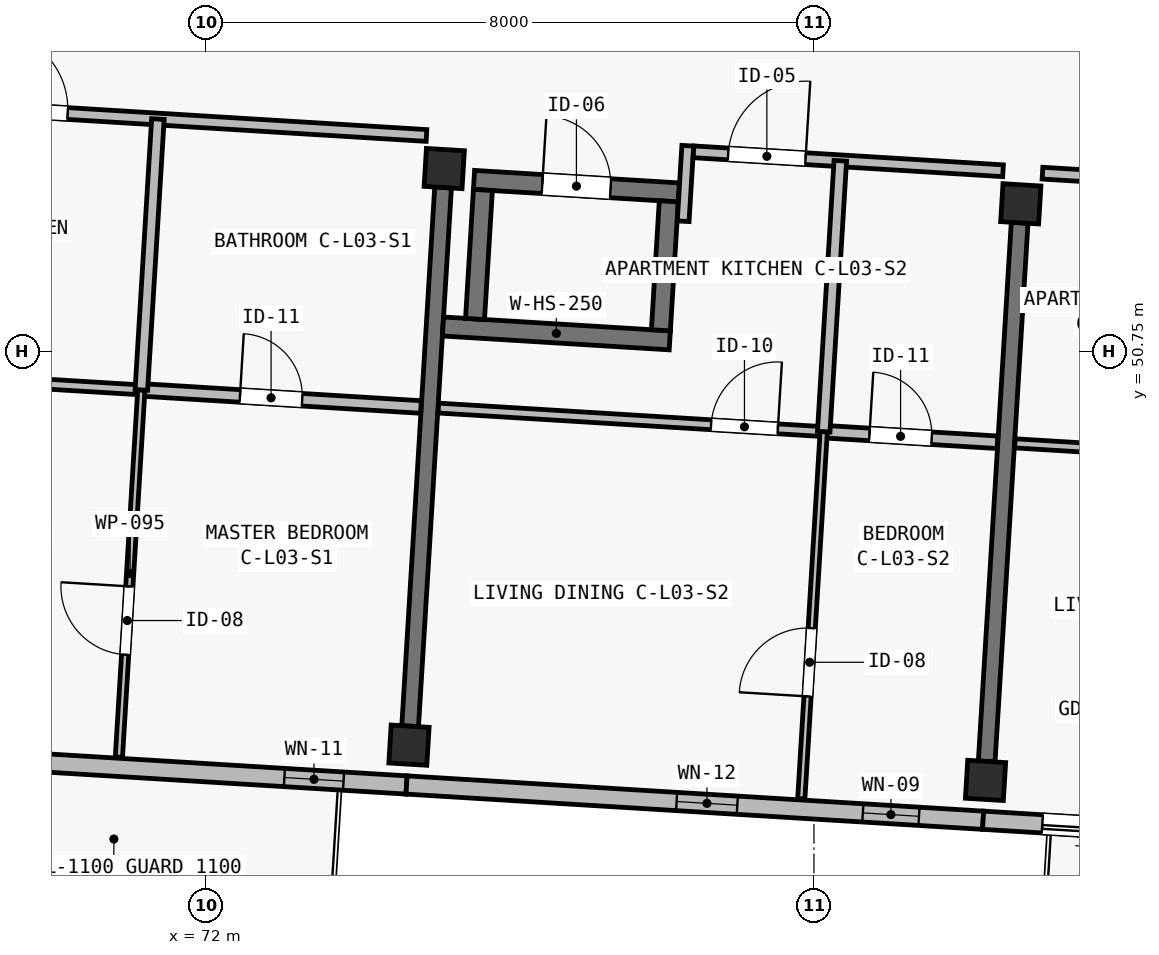
"""IFC4 building model, lengths in metres.
Left out: names, types, materials, properties, quantities, classifications, styles, units other than length and angle.
Written with IfcOpenShell. Run it as: python <this file> out.ifc"""

import sys

from ifc_helpers import new_model, si_unit, direction, frame, frame_2d, origin, origin_2d, place, context, subcontext, project, spatial, rectangle, extrude, element, fill, save


model = new_model("IFC4")
c1 = context("Model", 3, precision=1e-05, world=origin(), true_north=direction((0.0, 1.0)))
c2 = subcontext(c1, "Body", "Model", "MODEL_VIEW")
j1 = project(units=[si_unit("LENGTHUNIT", "METRE"), si_unit("PLANEANGLEUNIT", "RADIAN")], contexts=[c1])
p1 = place(None, origin())
s1 = spatial("IfcSite", under=j1, at=p1, CompositionType="ELEMENT")
p2 = place(p1, origin())
s2 = spatial("IfcBuilding", under=s1, at=p2, CompositionType="ELEMENT")
p3 = place(p2, frame((0.0, 0.0, 11.65)))
s3 = spatial("IfcBuildingStorey", under=s2, at=p3, CompositionType="ELEMENT", Elevation=11.65)
for number, where, z_axis, x_axis in (
    (1, (74.672, 45.572, 0.0), (0.0, 0.0, 1.0), (0.998, -0.061, 0.0)),
    (2, (75.135, 53.158, 0.0), (0.0, 0.0, 1.0), (0.998, -0.061, 0.0)),
    (3, (82.258, 45.108, 0.0), (0.0, 0.0, 1.0), (0.998, -0.061, 0.0)),
    (4, (82.721, 52.694, 0.0), (0.0, 0.0, 1.0), (0.998, -0.061, 0.0)),
):
    element("IfcColumn", number, at=place(p3, frame(where, z_axis=z_axis, x_axis=x_axis)), inside=s3, PredefinedType="COLUMN", context=c2, shape_type="SweptSolid", body=[
        extrude(rectangle(XDim=0.5, YDim=0.5, at=origin_2d()), origin(), (0.0, 0.0, 1.0), 3.25),
    ])
p4 = place(p3, frame((74.687, 45.822, 0.0), z_axis=(0.0, 0.0, 1.0), x_axis=(0.061033859059, 0.99813569621, 0.0)))
e5 = element("IfcWall", 5, at=p4, inside=s3, PredefinedType="SHEAR", context=c2, shape_type="SweptSolid", body=[
    extrude(rectangle(XDim=7.1, YDim=0.22, at=frame_2d((3.55, 0.0))), origin(), (0.0, 0.0, 1.0), 2.5),
])
p5 = place(p3, frame((82.273, 45.358, 0.0), z_axis=(0.0, 0.0, 1.0), x_axis=(0.061070212127, 0.998133472633, 0.0)))
e6 = element("IfcWall", 6, at=p5, inside=s3, PredefinedType="SHEAR", context=c2, shape_type="SweptSolid", body=[
    extrude(rectangle(XDim=7.1, YDim=0.22, at=frame_2d((3.55, 0.0))), origin(), (0.0, 0.0, 1.0), 2.5),
])
p6 = place(p3, frame((75.119, 51.08, 0.0), z_axis=(0.0, 0.0, 1.0), x_axis=(0.998133370443, -0.061071882298, 0.0)))
e7 = element("IfcWall", 7, at=p6, inside=s3, PredefinedType="SHEAR", context=c2, shape_type="SweptSolid", body=[
    extrude(rectangle(XDim=2.99, YDim=0.25, at=frame_2d((1.495, 0.0))), origin(), (0.0, 0.0, 1.0), 3.25),
])
p7 = place(p3, frame((75.527, 53.009, 0.0), z_axis=(0.0, 0.0, 1.0), x_axis=(0.998129907752, -0.061128448781, 0.0)))
e8 = element("IfcWall", 8, at=p7, inside=s3, PredefinedType="SHEAR", context=c2, shape_type="SweptSolid", body=[
    extrude(rectangle(XDim=2.7, YDim=0.25, at=frame_2d((1.35, 0.0))), origin(), (0.0, 0.0, 1.0), 3.25),
])
p8 = place(p7, frame((0.9, 0.0, 0.0)))
e9 = element("IfcOpeningElement", 9, at=p8, cuts=e8, PredefinedType="OPENING", context=c2, shape_type="SweptSolid", body=[
    extrude(rectangle(XDim=0.9, YDim=2.05, at=frame_2d((0.45, 1.025))), frame((0.0, 0.14, 0.0), z_axis=(0.0, -1.0, 0.0), x_axis=(1.0, 0.0, 0.0)), (0.0, 0.0, 1.0), 0.28),
])
p9 = place(p3, frame((75.541, 51.179, 0.0), z_axis=(0.0, 0.0, 1.0), x_axis=(0.061037062968, 0.998135500293, 0.0)))
e10 = element("IfcWall", 10, at=p9, inside=s3, PredefinedType="SHEAR", context=c2, shape_type="SweptSolid", body=[
    extrude(rectangle(XDim=1.7, YDim=0.25, at=frame_2d((0.85, 0.0))), origin(), (0.0, 0.0, 1.0), 3.25),
])
p10 = place(p3, frame((77.986, 51.03, 0.0), z_axis=(0.0, 0.0, 1.0), x_axis=(0.061028314627, 0.998136035225, 0.0)))
e11 = element("IfcWall", 11, at=p10, inside=s3, PredefinedType="SHEAR", context=c2, shape_type="SweptSolid", body=[
    extrude(rectangle(XDim=1.7, YDim=0.25, at=frame_2d((0.85, 0.0))), origin(), (0.0, 0.0, 1.0), 3.25),
])
p11 = place(p3, frame((74.64, 45.048, 0.0), z_axis=(0.0, 0.0, 1.0), x_axis=(-0.998135669243, 0.061034300063, 0.0)))
e12 = element("IfcWall", 12, at=p11, inside=s3, PredefinedType="SOLIDWALL", context=c2, shape_type="SweptSolid", body=[
    extrude(rectangle(XDim=7.6, YDim=0.24, at=frame_2d((3.8, 0.0))), origin(), (0.0, 0.0, 1.0), 3.0),
])
p12 = place(p11, frame((5.169, 0.0, 0.0)))
e13 = element("IfcOpeningElement", 13, at=p12, cuts=e12, PredefinedType="OPENING", context=c2, shape_type="SweptSolid", body=[
    extrude(rectangle(XDim=1.5, YDim=2.12, at=frame_2d((0.75, 1.06))), frame((0.0, 0.135, 0.0), z_axis=(0.0, -1.0, 0.0), x_axis=(1.0, 0.0, 0.0)), (0.0, 0.0, 1.0), 0.27),
])
p13 = place(p11, frame((0.83, 0.0, 0.46)))
e14 = element("IfcOpeningElement", 14, at=p13, cuts=e12, PredefinedType="OPENING", context=c2, shape_type="SweptSolid", body=[
    extrude(rectangle(XDim=0.78, YDim=2.2, at=frame_2d((0.39, 1.1))), frame((0.0, 0.135, 0.0), z_axis=(0.0, -1.0, 0.0), x_axis=(1.0, 0.0, 0.0)), (0.0, 0.0, 1.0), 0.27),
])
p14 = place(p3, frame((82.225, 44.584, 0.0), z_axis=(0.0, 0.0, 1.0), x_axis=(-0.998133591969, 0.061068261669, 0.0)))
e15 = element("IfcWall", 15, at=p14, inside=s3, PredefinedType="SOLIDWALL", context=c2, shape_type="SweptSolid", body=[
    extrude(rectangle(XDim=7.6, YDim=0.24, at=frame_2d((3.8, 0.0))), origin(), (0.0, 0.0, 1.0), 3.0),
])
p15 = place(p14, frame((0.845, 0.0, 0.52)))
e16 = element("IfcOpeningElement", 16, at=p15, cuts=e15, PredefinedType="OPENING", context=c2, shape_type="SweptSolid", body=[
    extrude(rectangle(XDim=0.74, YDim=2.26, at=frame_2d((0.37, 1.13))), frame((0.0, 0.135, 0.0), z_axis=(0.0, -1.0, 0.0), x_axis=(1.0, 0.0, 0.0)), (0.0, 0.0, 1.0), 0.27),
])
p16 = place(p14, frame((3.24, 0.0, 0.52)))
e17 = element("IfcOpeningElement", 17, at=p16, cuts=e15, PredefinedType="OPENING", context=c2, shape_type="SweptSolid", body=[
    extrude(rectangle(XDim=0.8, YDim=2.3, at=frame_2d((0.4, 1.15))), frame((0.0, 0.135, 0.0), z_axis=(0.0, -1.0, 0.0), x_axis=(1.0, 0.0, 0.0)), (0.0, 0.0, 1.0), 0.27),
])
p17 = place(p3, frame((89.811, 44.12, 0.0), z_axis=(0.0, 0.0, 1.0), x_axis=(-0.998135669243, 0.061034300063, 0.0)))
e18 = element("IfcWall", 18, at=p17, inside=s3, PredefinedType="SOLIDWALL", context=c2, shape_type="SweptSolid", body=[
    extrude(rectangle(XDim=7.6, YDim=0.24, at=frame_2d((3.8, 0.0))), origin(), (0.0, 0.0, 1.0), 3.0),
])
p18 = place(p17, frame((5.019, 0.0, 0.0)))
e19 = element("IfcOpeningElement", 19, at=p18, cuts=e18, PredefinedType="OPENING", context=c2, shape_type="SweptSolid", body=[
    extrude(rectangle(XDim=1.8, YDim=2.12, at=frame_2d((0.9, 1.06))), frame((0.0, 0.135, 0.0), z_axis=(0.0, -1.0, 0.0), x_axis=(1.0, 0.0, 0.0)), (0.0, 0.0, 1.0), 0.27),
])
p19 = place(p17, frame((1.03, 0.0, 0.42)))
e20 = element("IfcOpeningElement", 20, at=p19, cuts=e18, PredefinedType="OPENING", context=c2, shape_type="SweptSolid", body=[
    extrude(rectangle(XDim=0.6, YDim=2.22, at=frame_2d((0.3, 1.11))), frame((0.0, 0.135, 0.0), z_axis=(0.0, -1.0, 0.0), x_axis=(1.0, 0.0, 0.0)), (0.0, 0.0, 1.0), 0.27),
])
p20 = place(p3, frame((67.835, 54.025, 0.0), z_axis=(0.0, 0.0, 1.0), x_axis=(0.998135666539, -0.061034344288, 0.0)))
e21 = element("IfcWall", 21, at=p20, inside=s3, PredefinedType="PARTITIONING", context=c2, shape_type="SweptSolid", body=[
    extrude(rectangle(XDim=7.08, YDim=0.155, at=frame_2d((3.54, 0.0))), origin(), (0.0, 0.0, 1.0), 2.97),
])
p21 = place(p20, frame((1.33, 0.0, 0.0)))
e22 = element("IfcOpeningElement", 22, at=p21, cuts=e21, PredefinedType="OPENING", context=c2, shape_type="SweptSolid", body=[
    extrude(rectangle(XDim=1.02, YDim=2.2, at=frame_2d((0.51, 1.1))), frame((0.0, 0.093, 0.0), z_axis=(0.0, -1.0, 0.0), x_axis=(1.0, 0.0, 0.0)), (0.0, 0.0, 1.0), 0.185),
])
p22 = place(p3, frame((67.472, 50.471, 0.0), z_axis=(0.0, 0.0, 1.0), x_axis=(0.998136719672, -0.061017119263, 0.0)))
e23 = element("IfcWall", 23, at=p22, inside=s3, PredefinedType="PARTITIONING", context=c2, shape_type="SweptSolid", body=[
    extrude(rectangle(XDim=3.685, YDim=0.13, at=frame_2d((1.843, 0.0))), origin(), (0.0, 0.0, 1.0), 2.97),
])
p23 = place(p22, frame((1.525, 0.0, 0.0)))
e24 = element("IfcOpeningElement", 24, at=p23, cuts=e23, PredefinedType="OPENING", context=c2, shape_type="SweptSolid", body=[
    extrude(rectangle(XDim=0.88, YDim=2.1, at=frame_2d((0.44, 1.05))), frame((0.0, 0.08, 0.0), z_axis=(0.0, -1.0, 0.0), x_axis=(1.0, 0.0, 0.0)), (0.0, 0.0, 1.0), 0.16),
])
p24 = place(p3, frame((71.15, 50.246, 0.0), z_axis=(0.0, 0.0, 1.0), x_axis=(0.998132682596, -0.061083123148, 0.0)))
e25 = element("IfcWall", 25, at=p24, inside=s3, PredefinedType="PLUMBINGWALL", context=c2, shape_type="SweptSolid", body=[
    extrude(rectangle(XDim=3.685, YDim=0.165, at=frame_2d((1.843, 0.0))), origin(), (0.0, 0.0, 1.0), 2.97),
])
p25 = place(p24, frame((1.3, 0.0, 0.0)))
e26 = element("IfcOpeningElement", 26, at=p25, cuts=e25, PredefinedType="OPENING", context=c2, shape_type="SweptSolid", body=[
    extrude(rectangle(XDim=0.82, YDim=2.08, at=frame_2d((0.41, 1.04))), frame((0.0, 0.097, 0.0), z_axis=(0.0, -1.0, 0.0), x_axis=(1.0, 0.0, 0.0)), (0.0, 0.0, 1.0), 0.195),
])
p26 = place(p3, frame((70.855, 45.415, 0.0), z_axis=(0.0, 0.0, 1.0), x_axis=(0.061034170677, 0.998135677155, 0.0)))
e27 = element("IfcWall", 27, at=p26, inside=s3, PredefinedType="PARTITIONING", context=c2, shape_type="SweptSolid", body=[
    extrude(rectangle(XDim=4.84, YDim=0.095, at=frame_2d((2.42, 0.0))), origin(), (0.0, 0.0, 1.0), 2.97),
])
p27 = place(p26, frame((1.35, 0.0, 0.0)))
e28 = element("IfcOpeningElement", 28, at=p27, cuts=e27, PredefinedType="OPENING", context=c2, shape_type="SweptSolid", body=[
    extrude(rectangle(XDim=0.9, YDim=2.1, at=frame_2d((0.45, 1.05))), frame((0.0, 0.062, 0.0), z_axis=(0.0, -1.0, 0.0), x_axis=(1.0, 0.0, 0.0)), (0.0, 0.0, 1.0), 0.125),
])
p28 = place(p3, frame((71.15, 50.246, 0.0), z_axis=(0.0, 0.0, 1.0), x_axis=(0.061071129902, 0.998133416479, 0.0)))
e29 = element("IfcWall", 29, at=p28, inside=s3, PredefinedType="PLUMBINGWALL", context=c2, shape_type="SweptSolid", body=[
    extrude(rectangle(XDim=3.57, YDim=0.165, at=frame_2d((1.785, 0.0))), origin(), (0.0, 0.0, 1.0), 2.97),
])
p29 = place(p3, frame((78.279, 52.465, 0.0), z_axis=(0.0, 0.0, 1.0), x_axis=(0.061095097219, 0.998131949742, 0.0)))
e30 = element("IfcWall", 30, at=p29, inside=s3, PredefinedType="PARTITIONING", context=c2, shape_type="SweptSolid", body=[
    extrude(rectangle(XDim=0.995, YDim=0.155, at=frame_2d((0.498, 0.0))), origin(), (0.0, 0.0, 1.0), 2.97),
])
p30 = place(p3, frame((78.415, 53.378, 0.0), z_axis=(0.0, 0.0, 1.0), x_axis=(0.998131852862, -0.061096679962, 0.0)))
e31 = element("IfcWall", 31, at=p30, inside=s3, PredefinedType="PARTITIONING", context=c2, shape_type="SweptSolid", body=[
    extrude(rectangle(XDim=4.08, YDim=0.155, at=frame_2d((2.04, 0.0))), origin(), (0.0, 0.0, 1.0), 2.97),
])
p31 = place(p30, frame((0.457, 0.0, 0.0)))
e32 = element("IfcOpeningElement", 32, at=p31, cuts=e31, PredefinedType="OPENING", context=c2, shape_type="SweptSolid", body=[
    extrude(rectangle(XDim=1.02, YDim=2.2, at=frame_2d((0.51, 1.1))), frame((0.0, 0.093, 0.0), z_axis=(0.0, -1.0, 0.0), x_axis=(1.0, 0.0, 0.0)), (0.0, 0.0, 1.0), 0.185),
])
p32 = place(p3, frame((75.058, 50.007, 0.0), z_axis=(0.0, 0.0, 1.0), x_axis=(0.998132708268, -0.061082703655, 0.0)))
e33 = element("IfcWall", 33, at=p32, inside=s3, PredefinedType="PARTITIONING", context=c2, shape_type="SweptSolid", body=[
    extrude(rectangle(XDim=5.08, YDim=0.13, at=frame_2d((2.54, 0.0))), origin(), (0.0, 0.0, 1.0), 2.97),
])
p33 = place(p32, frame((3.595, 0.0, 0.0)))
e34 = element("IfcOpeningElement", 34, at=p33, cuts=e33, PredefinedType="OPENING", context=c2, shape_type="SweptSolid", body=[
    extrude(rectangle(XDim=0.88, YDim=2.1, at=frame_2d((0.44, 1.05))), frame((0.0, 0.08, 0.0), z_axis=(0.0, -1.0, 0.0), x_axis=(1.0, 0.0, 0.0)), (0.0, 0.0, 1.0), 0.16),
])
p34 = place(p3, frame((80.129, 49.697, 0.0), z_axis=(0.0, 0.0, 1.0), x_axis=(0.998138723231, -0.060984335579, 0.0)))
e35 = element("IfcWall", 35, at=p34, inside=s3, PredefinedType="PLUMBINGWALL", context=c2, shape_type="SweptSolid", body=[
    extrude(rectangle(XDim=2.29, YDim=0.165, at=frame_2d((1.145, 0.0))), origin(), (0.0, 0.0, 1.0), 2.97),
])
p35 = place(p34, frame((0.603, 0.0, 0.0)))
e36 = element("IfcOpeningElement", 36, at=p35, cuts=e35, PredefinedType="OPENING", context=c2, shape_type="SweptSolid", body=[
    extrude(rectangle(XDim=0.82, YDim=2.08, at=frame_2d((0.41, 1.04))), frame((0.0, 0.097, 0.0), z_axis=(0.0, -1.0, 0.0), x_axis=(1.0, 0.0, 0.0)), (0.0, 0.0, 1.0), 0.195),
])
p36 = place(p3, frame((79.833, 44.866, 0.0), z_axis=(0.0, 0.0, 1.0), x_axis=(0.061037243745, 0.998135489238, 0.0)))
e37 = element("IfcWall", 37, at=p36, inside=s3, PredefinedType="PARTITIONING", context=c2, shape_type="SweptSolid", body=[
    extrude(rectangle(XDim=4.84, YDim=0.095, at=frame_2d((2.42, 0.0))), origin(), (0.0, 0.0, 1.0), 2.97),
])
p37 = place(p36, frame((1.35, 0.0, 0.0)))
e38 = element("IfcOpeningElement", 38, at=p37, cuts=e37, PredefinedType="OPENING", context=c2, shape_type="SweptSolid", body=[
    extrude(rectangle(XDim=0.9, YDim=2.1, at=frame_2d((0.45, 1.05))), frame((0.0, 0.062, 0.0), z_axis=(0.0, -1.0, 0.0), x_axis=(1.0, 0.0, 0.0)), (0.0, 0.0, 1.0), 0.125),
])
p38 = place(p3, frame((80.129, 49.697, 0.0), z_axis=(0.0, 0.0, 1.0), x_axis=(0.061066961405, 0.998133671521, 0.0)))
e39 = element("IfcWall", 39, at=p38, inside=s3, PredefinedType="PLUMBINGWALL", context=c2, shape_type="SweptSolid", body=[
    extrude(rectangle(XDim=3.57, YDim=0.165, at=frame_2d((1.785, 0.0))), origin(), (0.0, 0.0, 1.0), 2.97),
])
p39 = place(p3, frame((83.007, 53.097, 0.0), z_axis=(0.0, 0.0, 1.0), x_axis=(0.998135666539, -0.061034344288, 0.0)))
e40 = element("IfcWall", 40, at=p39, inside=s3, PredefinedType="PARTITIONING", context=c2, shape_type="SweptSolid", body=[
    extrude(rectangle(XDim=7.08, YDim=0.155, at=frame_2d((3.54, 0.0))), origin(), (0.0, 0.0, 1.0), 2.97),
])
p40 = place(p39, frame((1.33, 0.0, 0.0)))
e41 = element("IfcOpeningElement", 41, at=p40, cuts=e40, PredefinedType="OPENING", context=c2, shape_type="SweptSolid", body=[
    extrude(rectangle(XDim=0.98, YDim=2.15, at=frame_2d((0.49, 1.075))), frame((0.0, 0.093, 0.0), z_axis=(0.0, -1.0, 0.0), x_axis=(1.0, 0.0, 0.0)), (0.0, 0.0, 1.0), 0.185),
])
p41 = place(p3, frame((82.644, 49.543, 0.0), z_axis=(0.0, 0.0, 1.0), x_axis=(0.998136472989, -0.061021154439, 0.0)))
e42 = element("IfcWall", 42, at=p41, inside=s3, PredefinedType="PARTITIONING", context=c2, shape_type="SweptSolid", body=[
    extrude(rectangle(XDim=3.685, YDim=0.12, at=frame_2d((1.842, 0.0))), origin(), (0.0, 0.0, 1.0), 2.97),
])
p42 = place(p41, frame((1.525, 0.0, 0.0)))
e43 = element("IfcOpeningElement", 43, at=p42, cuts=e42, PredefinedType="OPENING", context=c2, shape_type="SweptSolid", body=[
    extrude(rectangle(XDim=0.9, YDim=2.1, at=frame_2d((0.45, 1.05))), frame((0.0, 0.075, 0.0), z_axis=(0.0, -1.0, 0.0), x_axis=(1.0, 0.0, 0.0)), (0.0, 0.0, 1.0), 0.15),
])
p43 = place(p13, origin())
e44 = element("IfcWindow", 44, at=p43, inside=s3, PartitioningType="SINGLE_PANEL", PredefinedType="WINDOW", context=c2, shape_type="SweptSolid", body=[
    extrude(rectangle(XDim=0.78, YDim=2.2, at=frame_2d((0.39, 1.1))), frame((0.0, 0.03, 0.0), z_axis=(0.0, -1.0, 0.0), x_axis=(1.0, 0.0, 0.0)), (0.0, 0.0, 1.0), 0.06),
])
fill(e14, e44)
p44 = place(p15, origin())
e45 = element("IfcWindow", 45, at=p44, inside=s3, PartitioningType="SINGLE_PANEL", PredefinedType="WINDOW", context=c2, shape_type="SweptSolid", body=[
    extrude(rectangle(XDim=0.74, YDim=2.26, at=frame_2d((0.37, 1.13))), frame((0.0, 0.03, 0.0), z_axis=(0.0, -1.0, 0.0), x_axis=(1.0, 0.0, 0.0)), (0.0, 0.0, 1.0), 0.06),
])
fill(e16, e45)
p45 = place(p16, origin())
e46 = element("IfcWindow", 46, at=p45, inside=s3, PartitioningType="SINGLE_PANEL", PredefinedType="WINDOW", context=c2, shape_type="SweptSolid", body=[
    extrude(rectangle(XDim=0.8, YDim=2.3, at=frame_2d((0.4, 1.15))), frame((0.0, 0.03, 0.0), z_axis=(0.0, -1.0, 0.0), x_axis=(1.0, 0.0, 0.0)), (0.0, 0.0, 1.0), 0.06),
])
fill(e17, e46)
p46 = place(p18, origin())
e47 = element("IfcDoor", 47, at=p46, inside=s3, OperationType="SLIDING_TO_LEFT", PredefinedType="DOOR", context=c2, shape_type="SweptSolid", body=[
    extrude(rectangle(XDim=1.8, YDim=2.12, at=frame_2d((0.9, 1.06))), frame((0.0, 0.025, 0.0), z_axis=(0.0, -1.0, 0.0), x_axis=(1.0, 0.0, 0.0)), (0.0, 0.0, 1.0), 0.05),
])
fill(e19, e47)
p47 = place(p21, origin())
e48 = element("IfcDoor", 48, at=p47, inside=s3, OperationType="SINGLE_SWING_LEFT", PredefinedType="DOOR", context=c2, shape_type="SweptSolid", body=[
    extrude(rectangle(XDim=1.02, YDim=2.2, at=frame_2d((0.51, 1.1))), frame((0.0, 0.025, 0.0), z_axis=(0.0, -1.0, 0.0), x_axis=(1.0, 0.0, 0.0)), (0.0, 0.0, 1.0), 0.05),
])
fill(e22, e48)
p48 = place(p25, origin())
e49 = element("IfcDoor", 49, at=p48, inside=s3, OperationType="SINGLE_SWING_LEFT", PredefinedType="DOOR", context=c2, shape_type="SweptSolid", body=[
    extrude(rectangle(XDim=0.82, YDim=2.08, at=frame_2d((0.41, 1.04))), frame((0.0, 0.025, 0.0), z_axis=(0.0, -1.0, 0.0), x_axis=(1.0, 0.0, 0.0)), (0.0, 0.0, 1.0), 0.05),
])
fill(e26, e49)
p49 = place(p27, origin())
e50 = element("IfcDoor", 50, at=p49, inside=s3, OperationType="SINGLE_SWING_RIGHT", PredefinedType="DOOR", context=c2, shape_type="SweptSolid", body=[
    extrude(rectangle(XDim=0.9, YDim=2.1, at=frame_2d((0.45, 1.05))), frame((0.0, 0.025, 0.0), z_axis=(0.0, -1.0, 0.0), x_axis=(1.0, 0.0, 0.0)), (0.0, 0.0, 1.0), 0.05),
])
fill(e28, e50)
p50 = place(p31, origin())
e51 = element("IfcDoor", 51, at=p50, inside=s3, OperationType="SINGLE_SWING_RIGHT", PredefinedType="DOOR", context=c2, shape_type="SweptSolid", body=[
    extrude(rectangle(XDim=1.02, YDim=2.2, at=frame_2d((0.51, 1.1))), frame((0.0, 0.025, 0.0), z_axis=(0.0, -1.0, 0.0), x_axis=(1.0, 0.0, 0.0)), (0.0, 0.0, 1.0), 0.05),
])
fill(e32, e51)
p51 = place(p33, origin())
e52 = element("IfcDoor", 52, at=p51, inside=s3, OperationType="SINGLE_SWING_RIGHT", PredefinedType="DOOR", context=c2, shape_type="SweptSolid", body=[
    extrude(rectangle(XDim=0.88, YDim=2.1, at=frame_2d((0.44, 1.05))), frame((0.0, 0.025, 0.0), z_axis=(0.0, -1.0, 0.0), x_axis=(1.0, 0.0, 0.0)), (0.0, 0.0, 1.0), 0.05),
])
fill(e34, e52)
p52 = place(p35, origin())
e53 = element("IfcDoor", 53, at=p52, inside=s3, OperationType="SINGLE_SWING_LEFT", PredefinedType="DOOR", context=c2, shape_type="SweptSolid", body=[
    extrude(rectangle(XDim=0.82, YDim=2.08, at=frame_2d((0.41, 1.04))), frame((0.0, 0.025, 0.0), z_axis=(0.0, -1.0, 0.0), x_axis=(1.0, 0.0, 0.0)), (0.0, 0.0, 1.0), 0.05),
])
fill(e36, e53)
p53 = place(p37, origin())
e54 = element("IfcDoor", 54, at=p53, inside=s3, OperationType="SINGLE_SWING_LEFT", PredefinedType="DOOR", context=c2, shape_type="SweptSolid", body=[
    extrude(rectangle(XDim=0.9, YDim=2.1, at=frame_2d((0.45, 1.05))), frame((0.0, 0.025, 0.0), z_axis=(0.0, -1.0, 0.0), x_axis=(1.0, 0.0, 0.0)), (0.0, 0.0, 1.0), 0.05),
])
fill(e38, e54)
p54 = place(p8, origin())
e55 = element("IfcDoor", 55, at=p54, inside=s3, OperationType="SINGLE_SWING_LEFT", PredefinedType="DOOR", context=c2, shape_type="SweptSolid", body=[
    extrude(rectangle(XDim=0.9, YDim=2.05, at=frame_2d((0.45, 1.025))), frame((0.0, 0.025, 0.0), z_axis=(0.0, -1.0, 0.0), x_axis=(1.0, 0.0, 0.0)), (0.0, 0.0, 1.0), 0.05),
])
fill(e9, e55)
save(model, sys.argv[1])
